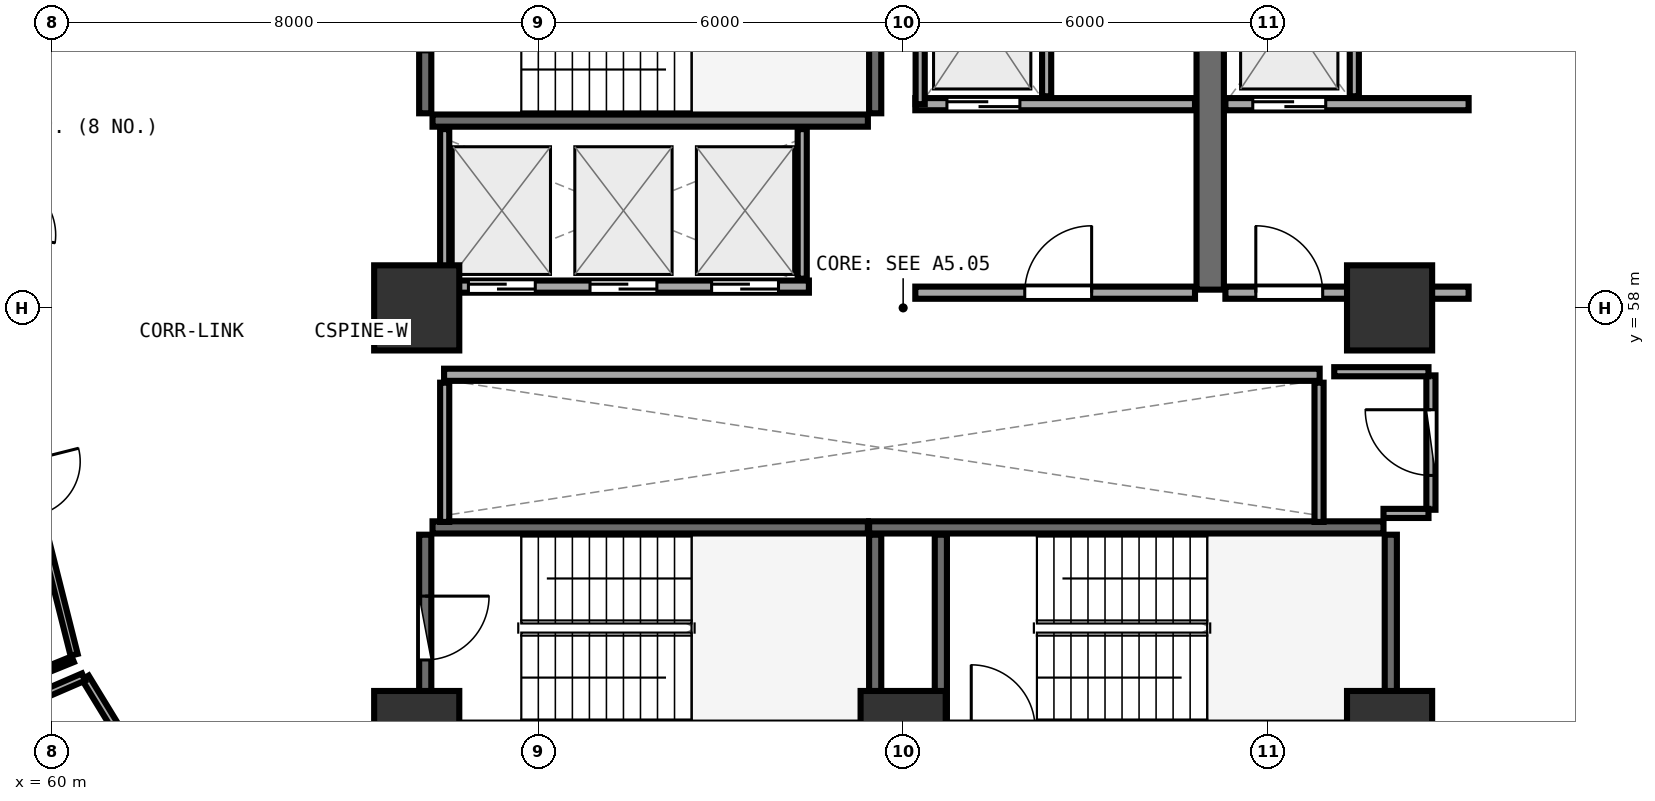
"""IFC4 building model, lengths in metres.
Left out: names, types, materials, properties, quantities, classifications, styles, units other than length and angle.
Written with IfcOpenShell. Run it as: python <this file> out.ifc"""

import sys

from ifc_helpers import new_model, si_unit, direction, frame, frame_2d, origin, origin_2d, place, context, subcontext, project, spatial, rectangle, extrude, element, fill, save


model = new_model("IFC4")
c1 = context("Model", 3, precision=1e-05, world=origin(), true_north=direction((0.0, 1.0)))
c2 = subcontext(c1, "Body", "Model", "MODEL_VIEW")
j1 = project(units=[si_unit("LENGTHUNIT", "METRE"), si_unit("PLANEANGLEUNIT", "RADIAN")], contexts=[c1])
p1 = place(None, origin())
s1 = spatial("IfcSite", under=j1, at=p1, CompositionType="ELEMENT")
p2 = place(p1, origin())
s2 = spatial("IfcBuilding", under=s1, at=p2, CompositionType="ELEMENT")
p3 = place(p2, frame((0.0, 0.0, 26.25)))
s3 = spatial("IfcBuildingStorey", under=s2, at=p3, CompositionType="ELEMENT", Elevation=26.25)
for number, where, z_axis, x_axis in (
    (1, (66.0, 51.0, 0.0), (0.0, 0.0, 1.0), (1.0, 0.0, 0.0)),
    (2, (74.0, 51.0, 0.0), (0.0, 0.0, 1.0), (1.0, 0.0, 0.0)),
    (3, (82.0, 51.0, 0.0), (0.0, 0.0, 1.0), (1.0, 0.0, 0.0)),
    (4, (82.0, 58.0, 0.0), (0.0, 0.0, 1.0), (1.0, 0.0, 0.0)),
    (5, (66.0, 58.0, 0.0), (0.0, 0.0, 1.0), (1.0, 0.0, 0.0)),
):
    element("IfcColumn", number, at=place(p3, frame(where, z_axis=z_axis, x_axis=x_axis)), inside=s3, PredefinedType="PILASTER", context=c2, shape_type="SweptSolid", body=[
        extrude(rectangle(XDim=1.4, YDim=1.4, at=origin_2d()), origin(), (0.0, 0.0, 1.0), 3.75),
    ])
p4 = place(p3, frame((66.26, 61.08, 0.0), z_axis=(0.0, 0.0, 1.0), x_axis=(1.0, 0.0, 0.0)))
e6 = element("IfcWall", 6, at=p4, inside=s3, PredefinedType="SHEAR", context=c2, shape_type="SweptSolid", body=[
    extrude(rectangle(XDim=7.16, YDim=0.2, at=frame_2d((3.58, 0.0))), origin(), (0.0, 0.0, 1.0), 3.49),
])
p5 = place(p3, frame((73.54, 61.2, 0.0), z_axis=(0.0, 0.0, 1.0), x_axis=(0.0, 1.0, 0.0)))
e7 = element("IfcWall", 7, at=p5, inside=s3, PredefinedType="SHEAR", context=c2, shape_type="SweptSolid", body=[
    extrude(rectangle(XDim=3.07, YDim=0.2, at=frame_2d((1.535, 0.0))), origin(), (0.0, 0.0, 1.0), 3.49),
])
p6 = place(p3, frame((66.14, 64.27, 0.0), z_axis=(0.0, 0.0, 1.0), x_axis=(0.0, -1.0, 0.0)))
e8 = element("IfcWall", 8, at=p6, inside=s3, PredefinedType="SHEAR", context=c2, shape_type="SweptSolid", body=[
    extrude(rectangle(XDim=3.07, YDim=0.2, at=frame_2d((1.535, 0.0))), origin(), (0.0, 0.0, 1.0), 3.49),
])
p7 = place(p6, frame((1.01, 0.0, 0.0)))
e9 = element("IfcOpeningElement", 9, at=p7, cuts=e8, PredefinedType="OPENING", context=c2, shape_type="SweptSolid", body=[
    extrude(rectangle(XDim=1.05, YDim=2.1, at=frame_2d((0.525, 1.05))), frame((0.0, 0.11, 0.0), z_axis=(0.0, -1.0, 0.0), x_axis=(1.0, 0.0, 0.0)), (0.0, 0.0, 1.0), 0.22),
])
p8 = place(p3, frame((82.02, 51.2, 0.0), z_axis=(0.0, 0.0, 1.0), x_axis=(0.0, 1.0, 0.0)))
e10 = element("IfcWall", 10, at=p8, inside=s3, PredefinedType="SHEAR", context=c2, shape_type="SweptSolid", body=[
    extrude(rectangle(XDim=3.07, YDim=0.2, at=frame_2d((1.535, 0.0))), origin(), (0.0, 0.0, 1.0), 3.49),
])
p9 = place(p3, frame((81.9, 54.39, 0.0), z_axis=(0.0, 0.0, 1.0), x_axis=(-1.0, 0.0, 0.0)))
e11 = element("IfcWall", 11, at=p9, inside=s3, PredefinedType="SHEAR", context=c2, shape_type="SweptSolid", body=[
    extrude(rectangle(XDim=8.46, YDim=0.2, at=frame_2d((4.23, 0.0))), origin(), (0.0, 0.0, 1.0), 3.49),
])
for number, where, z_axis, x_axis in (
    (12, (74.62, 54.27, 0.0), (0.0, 0.0, 1.0), (0.0, -1.0, 0.0)),
    (13, (73.54, 51.2, 0.0), (0.0, 0.0, 1.0), (0.0, 1.0, 0.0)),
):
    element("IfcWall", number, at=place(p3, frame(where, z_axis=z_axis, x_axis=x_axis)), inside=s3, PredefinedType="SHEAR", context=c2, shape_type="SweptSolid", body=[
        extrude(rectangle(XDim=3.07, YDim=0.2, at=frame_2d((1.535, 0.0))), origin(), (0.0, 0.0, 1.0), 3.49),
    ])
p10 = place(p3, frame((73.42, 54.39, 0.0), z_axis=(0.0, 0.0, 1.0), x_axis=(-1.0, 0.0, 0.0)))
e14 = element("IfcWall", 14, at=p10, inside=s3, PredefinedType="SHEAR", context=c2, shape_type="SweptSolid", body=[
    extrude(rectangle(XDim=7.16, YDim=0.2, at=frame_2d((3.58, 0.0))), origin(), (0.0, 0.0, 1.0), 3.49),
])
p11 = place(p3, frame((66.14, 54.27, 0.0), z_axis=(0.0, 0.0, 1.0), x_axis=(0.0, -1.0, 0.0)))
e15 = element("IfcWall", 15, at=p11, inside=s3, PredefinedType="SHEAR", context=c2, shape_type="SweptSolid", body=[
    extrude(rectangle(XDim=3.07, YDim=0.2, at=frame_2d((1.535, 0.0))), origin(), (0.0, 0.0, 1.0), 3.49),
])
p12 = place(p11, frame((1.01, 0.0, 0.0)))
e16 = element("IfcOpeningElement", 16, at=p12, cuts=e15, PredefinedType="OPENING", context=c2, shape_type="SweptSolid", body=[
    extrude(rectangle(XDim=1.05, YDim=2.1, at=frame_2d((0.525, 1.05))), frame((0.0, 0.11, 0.0), z_axis=(0.0, -1.0, 0.0), x_axis=(1.0, 0.0, 0.0)), (0.0, 0.0, 1.0), 0.22),
])
p13 = place(p3, frame((79.05, 58.3, 0.0), z_axis=(0.0, 0.0, 1.0), x_axis=(0.0, 1.0, 0.0)))
e17 = element("IfcWall", 17, at=p13, inside=s3, PredefinedType="SHEAR", context=c2, shape_type="SweptSolid", body=[
    extrude(rectangle(XDim=6.3, YDim=0.45, at=frame_2d((3.15, 0.0))), origin(), (0.0, 0.0, 1.0), 3.49),
])
p14 = place(p3, frame((74.2, 61.35, 0.0), z_axis=(0.0, 0.0, 1.0), x_axis=(1.0, 0.0, 0.0)))
e18 = element("IfcWall", 18, at=p14, inside=s3, PredefinedType="SOLIDWALL", context=c2, shape_type="SweptSolid", body=[
    extrude(rectangle(XDim=4.6, YDim=0.2, at=frame_2d((2.3, 0.0))), origin(), (0.0, 0.0, 1.0), 3.48),
])
p15 = place(p14, frame((0.52, 0.0, 0.0)))
e19 = element("IfcOpeningElement", 19, at=p15, cuts=e18, PredefinedType="OPENING", context=c2, shape_type="SweptSolid", body=[
    extrude(rectangle(XDim=1.2, YDim=2.15, at=frame_2d((0.6, 1.075))), frame((0.0, 0.11, 0.0), z_axis=(0.0, -1.0, 0.0), x_axis=(1.0, 0.0, 0.0)), (0.0, 0.0, 1.0), 0.22),
])
p16 = place(p3, frame((74.28, 61.35, 0.0), z_axis=(0.0, 0.0, 1.0), x_axis=(0.0, 1.0, 0.0)))
e20 = element("IfcWall", 20, at=p16, inside=s3, PredefinedType="PARTITIONING", context=c2, shape_type="SweptSolid", body=[
    extrude(rectangle(XDim=2.97, YDim=0.15, at=frame_2d((1.485, 0.0))), origin(), (0.0, 0.0, 1.0), 3.48),
])
p17 = place(p3, frame((76.36, 61.48, 0.0), z_axis=(0.0, 0.0, 1.0), x_axis=(0.0, 1.0, 0.0)))
e21 = element("IfcWall", 21, at=p17, inside=s3, PredefinedType="PARTITIONING", context=c2, shape_type="SweptSolid", body=[
    extrude(rectangle(XDim=2.84, YDim=0.15, at=frame_2d((1.42, 0.0))), origin(), (0.0, 0.0, 1.0), 3.48),
])
p18 = place(p3, frame((79.3, 61.35, 0.0), z_axis=(0.0, 0.0, 1.0), x_axis=(1.0, 0.0, 0.0)))
e22 = element("IfcWall", 22, at=p18, inside=s3, PredefinedType="SOLIDWALL", context=c2, shape_type="SweptSolid", body=[
    extrude(rectangle(XDim=4.0, YDim=0.2, at=frame_2d((2.0, 0.0))), origin(), (0.0, 0.0, 1.0), 2.775),
])
p19 = place(p18, frame((0.45, 0.0, 0.0)))
e23 = element("IfcOpeningElement", 23, at=p19, cuts=e22, PredefinedType="OPENING", context=c2, shape_type="SweptSolid", body=[
    extrude(rectangle(XDim=1.2, YDim=2.15, at=frame_2d((0.6, 1.075))), frame((0.0, 0.11, 0.0), z_axis=(0.0, -1.0, 0.0), x_axis=(1.0, 0.0, 0.0)), (0.0, 0.0, 1.0), 0.22),
])
p20 = place(p3, frame((81.42, 61.48, 0.0), z_axis=(0.0, 0.0, 1.0), x_axis=(0.0, 1.0, 0.0)))
e24 = element("IfcWall", 24, at=p20, inside=s3, PredefinedType="PARTITIONING", context=c2, shape_type="SweptSolid", body=[
    extrude(rectangle(XDim=2.84, YDim=0.15, at=frame_2d((1.42, 0.0))), origin(), (0.0, 0.0, 1.0), 3.48),
])
p21 = place(p3, frame((74.2, 58.25, 0.0), z_axis=(0.0, 0.0, 1.0), x_axis=(1.0, 0.0, 0.0)))
e25 = element("IfcWall", 25, at=p21, inside=s3, PredefinedType="SOLIDWALL", context=c2, shape_type="SweptSolid", body=[
    extrude(rectangle(XDim=4.6, YDim=0.2, at=frame_2d((2.3, 0.0))), origin(), (0.0, 0.0, 1.0), 3.48),
])
p22 = place(p21, frame((1.8, 0.0, 0.0)))
e26 = element("IfcOpeningElement", 26, at=p22, cuts=e25, PredefinedType="OPENING", context=c2, shape_type="SweptSolid", body=[
    extrude(rectangle(XDim=1.1, YDim=2.1, at=frame_2d((0.55, 1.05))), frame((0.0, 0.11, 0.0), z_axis=(0.0, -1.0, 0.0), x_axis=(1.0, 0.0, 0.0)), (0.0, 0.0, 1.0), 0.22),
])
p23 = place(p3, frame((79.3, 58.25, 0.0), z_axis=(0.0, 0.0, 1.0), x_axis=(1.0, 0.0, 0.0)))
e27 = element("IfcWall", 27, at=p23, inside=s3, PredefinedType="SOLIDWALL", context=c2, shape_type="SweptSolid", body=[
    extrude(rectangle(XDim=4.0, YDim=0.2, at=frame_2d((2.0, 0.0))), origin(), (0.0, 0.0, 1.0), 2.775),
])
p24 = place(p23, frame((0.5, 0.0, 0.0)))
e28 = element("IfcOpeningElement", 28, at=p24, cuts=e27, PredefinedType="OPENING", context=c2, shape_type="SweptSolid", body=[
    extrude(rectangle(XDim=1.1, YDim=2.1, at=frame_2d((0.55, 1.05))), frame((0.0, 0.11, 0.0), z_axis=(0.0, -1.0, 0.0), x_axis=(1.0, 0.0, 0.0)), (0.0, 0.0, 1.0), 0.22),
])
p25 = place(p3, frame((66.45, 58.35, 0.0), z_axis=(0.0, 0.0, 1.0), x_axis=(1.0, 0.0, 0.0)))
e29 = element("IfcWall", 29, at=p25, inside=s3, PredefinedType="SOLIDWALL", context=c2, shape_type="SweptSolid", body=[
    extrude(rectangle(XDim=6.0, YDim=0.2, at=frame_2d((3.0, 0.0))), origin(), (0.0, 0.0, 1.0), 3.48),
])
p26 = place(p25, frame((0.4, 0.0, 0.0)))
e30 = element("IfcOpeningElement", 30, at=p26, cuts=e29, PredefinedType="OPENING", context=c2, shape_type="SweptSolid", body=[
    extrude(rectangle(XDim=1.1, YDim=2.1, at=frame_2d((0.55, 1.05))), frame((0.0, 0.11, 0.0), z_axis=(0.0, -1.0, 0.0), x_axis=(1.0, 0.0, 0.0)), (0.0, 0.0, 1.0), 0.22),
])
p27 = place(p25, frame((2.4, 0.0, 0.0)))
e31 = element("IfcOpeningElement", 31, at=p27, cuts=e29, PredefinedType="OPENING", context=c2, shape_type="SweptSolid", body=[
    extrude(rectangle(XDim=1.1, YDim=2.1, at=frame_2d((0.55, 1.05))), frame((0.0, 0.11, 0.0), z_axis=(0.0, -1.0, 0.0), x_axis=(1.0, 0.0, 0.0)), (0.0, 0.0, 1.0), 0.22),
])
p28 = place(p25, frame((4.4, 0.0, 0.0)))
e32 = element("IfcOpeningElement", 32, at=p28, cuts=e29, PredefinedType="OPENING", context=c2, shape_type="SweptSolid", body=[
    extrude(rectangle(XDim=1.1, YDim=2.1, at=frame_2d((0.55, 1.05))), frame((0.0, 0.11, 0.0), z_axis=(0.0, -1.0, 0.0), x_axis=(1.0, 0.0, 0.0)), (0.0, 0.0, 1.0), 0.22),
])
for number, where, z_axis, x_axis in (
    (33, (66.46, 58.48, 0.0), (0.0, 0.0, 1.0), (0.0, 1.0, 0.0)),
    (34, (72.34, 58.48, 0.0), (0.0, 0.0, 1.0), (0.0, 1.0, 0.0)),
):
    element("IfcWall", number, at=place(p3, frame(where, z_axis=z_axis, x_axis=x_axis)), inside=s3, PredefinedType="PARTITIONING", context=c2, shape_type="SweptSolid", body=[
        extrude(rectangle(XDim=2.46, YDim=0.15, at=frame_2d((1.23, 0.0))), origin(), (0.0, 0.0, 1.0), 3.48),
    ])
p29 = place(p3, frame((66.45, 56.9, 0.0), z_axis=(0.0, 0.0, 1.0), x_axis=(1.0, 0.0, 0.0)))
e35 = element("IfcWall", 35, at=p29, inside=s3, PredefinedType="SOLIDWALL", context=c2, shape_type="SweptSolid", body=[
    extrude(rectangle(XDim=14.4, YDim=0.2, at=frame_2d((7.2, 0.0))), origin(), (0.0, 0.0, 1.0), 3.48),
])
for number, where, z_axis, x_axis in (
    (36, (66.46, 54.48, 0.0), (0.0, 0.0, 1.0), (0.0, 1.0, 0.0)),
    (37, (80.84, 54.48, 0.0), (0.0, 0.0, 1.0), (0.0, 1.0, 0.0)),
):
    element("IfcWall", number, at=place(p3, frame(where, z_axis=z_axis, x_axis=x_axis)), inside=s3, PredefinedType="PARTITIONING", context=c2, shape_type="SweptSolid", body=[
        extrude(rectangle(XDim=2.29, YDim=0.15, at=frame_2d((1.145, 0.0))), origin(), (0.0, 0.0, 1.0), 3.48),
    ])
p30 = place(p3, frame((82.68, 54.68, 0.0), z_axis=(0.0, 0.0, 1.0), x_axis=(0.0, 1.0, 0.0)))
e38 = element("IfcWall", 38, at=p30, inside=s3, PredefinedType="PARTITIONING", context=c2, shape_type="SweptSolid", body=[
    extrude(rectangle(XDim=2.21, YDim=0.15, at=frame_2d((1.105, 0.0))), origin(), (0.0, 0.0, 1.0), 3.48),
])
p31 = place(p30, frame((0.565, 0.0, 0.0)))
e39 = element("IfcOpeningElement", 39, at=p31, cuts=e38, PredefinedType="OPENING", context=c2, shape_type="SweptSolid", body=[
    extrude(rectangle(XDim=1.08, YDim=2.1, at=frame_2d((0.54, 1.05))), frame((0.0, 0.085, 0.0), z_axis=(0.0, -1.0, 0.0), x_axis=(1.0, 0.0, 0.0)), (0.0, 0.0, 1.0), 0.17),
])
p32 = place(p3, frame((58.986, 57.775, 0.0), z_axis=(0.0, 0.0, 1.0), x_axis=(0.244192294026, -0.969726829338, 0.0)))
e40 = element("IfcWall", 40, at=p32, inside=s3, PredefinedType="PARTITIONING", context=c2, shape_type="SweptSolid", body=[
    extrude(rectangle(XDim=5.651, YDim=0.12, at=frame_2d((2.825, 0.0))), origin(), (0.0, 0.0, 1.0), 3.48),
])
p33 = place(p32, frame((2.375, 0.0, 0.0)))
e41 = element("IfcOpeningElement", 41, at=p33, cuts=e40, PredefinedType="OPENING", context=c2, shape_type="SweptSolid", body=[
    extrude(rectangle(XDim=0.9, YDim=2.08, at=frame_2d((0.45, 1.04))), frame((0.0, 0.07, 0.0), z_axis=(0.0, -1.0, 0.0), x_axis=(1.0, 0.0, 0.0)), (0.0, 0.0, 1.0), 0.14),
])
p34 = place(p3, frame((81.9, 54.62, 0.0), z_axis=(0.0, 0.0, 1.0), x_axis=(1.0, 0.0, 0.0)))
e42 = element("IfcWall", 42, at=p34, inside=s3, PredefinedType="PARTITIONING", context=c2, shape_type="SweptSolid", body=[
    extrude(rectangle(XDim=0.74, YDim=0.15, at=frame_2d((0.37, 0.0))), origin(), (0.0, 0.0, 1.0), 2.775),
])
p35 = place(p3, frame((82.64, 56.95, 0.0), z_axis=(0.0, 0.0, 1.0), x_axis=(-1.0, 0.0, 0.0)))
e43 = element("IfcWall", 43, at=p35, inside=s3, PredefinedType="PARTITIONING", context=c2, shape_type="SweptSolid", body=[
    extrude(rectangle(XDim=1.55, YDim=0.15, at=frame_2d((0.775, 0.0))), origin(), (0.0, 0.0, 1.0), 2.775),
])
p36 = place(p3, frame((60.343, 52.222, 0.0), z_axis=(0.0, 0.0, 1.0), x_axis=(-0.926333713065, -0.376703931542, 0.0)))
e44 = element("IfcWall", 44, at=p36, inside=s3, PredefinedType="PARTITIONING", context=c2, shape_type="SweptSolid", body=[
    extrude(rectangle(XDim=12.099, YDim=0.1, at=frame_2d((6.05, 0.0))), origin(), (0.0, 0.0, 1.0), 2.875),
])
p37 = place(p3, frame((60.549, 51.92, 0.0), z_axis=(0.0, 0.0, 1.0), x_axis=(0.52146609248, -0.853272004928, 0.0)))
e45 = element("IfcWall", 45, at=p37, inside=s3, PredefinedType="PLUMBINGWALL", context=c2, shape_type="SweptSolid", body=[
    extrude(rectangle(XDim=1.228, YDim=0.13, at=frame_2d((0.614, 0.0))), origin(), (0.0, 0.0, 1.0), 3.48),
])
p38 = place(p3, frame((55.91, 49.935, 0.0), z_axis=(0.0, 0.0, 1.0), x_axis=(0.917797204715, 0.397049481826, 0.0)))
e46 = element("IfcWall", 46, at=p38, inside=s3, PredefinedType="PLUMBINGWALL", context=c2, shape_type="SweptSolid", body=[
    extrude(rectangle(XDim=5.023, YDim=0.13, at=frame_2d((2.511, 0.0))), origin(), (0.0, 0.0, 1.0), 2.875),
])
p39 = place(p12, origin())
e47 = element("IfcDoor", 47, at=p39, inside=s3, OperationType="SINGLE_SWING_LEFT", PredefinedType="DOOR", context=c2, shape_type="SweptSolid", body=[
    extrude(rectangle(XDim=1.05, YDim=2.1, at=frame_2d((0.525, 1.05))), frame((0.0, 0.025, 0.0), z_axis=(0.0, -1.0, 0.0), x_axis=(1.0, 0.0, 0.0)), (0.0, 0.0, 1.0), 0.05),
])
fill(e16, e47)
p40 = place(p15, origin())
e48 = element("IfcDoor", 48, at=p40, inside=s3, OperationType="DOUBLE_DOOR_SLIDING", PredefinedType="DOOR", context=c2, shape_type="SweptSolid", body=[
    extrude(rectangle(XDim=1.2, YDim=2.15, at=frame_2d((0.6, 1.075))), frame((0.0, 0.025, 0.0), z_axis=(0.0, -1.0, 0.0), x_axis=(1.0, 0.0, 0.0)), (0.0, 0.0, 1.0), 0.05),
])
fill(e19, e48)
p41 = place(p19, origin())
e49 = element("IfcDoor", 49, at=p41, inside=s3, OperationType="DOUBLE_DOOR_SLIDING", PredefinedType="DOOR", context=c2, shape_type="SweptSolid", body=[
    extrude(rectangle(XDim=1.2, YDim=2.15, at=frame_2d((0.6, 1.075))), frame((0.0, 0.025, 0.0), z_axis=(0.0, -1.0, 0.0), x_axis=(1.0, 0.0, 0.0)), (0.0, 0.0, 1.0), 0.05),
])
fill(e23, e49)
p42 = place(p22, frame((1.1, 0.0, 0.0), z_axis=(0.0, 0.0, 1.0), x_axis=(-1.0, 0.0, 0.0)))
e50 = element("IfcDoor", 50, at=p42, inside=s3, OperationType="SINGLE_SWING_LEFT", PredefinedType="DOOR", context=c2, shape_type="SweptSolid", body=[
    extrude(rectangle(XDim=1.1, YDim=2.1, at=frame_2d((0.55, 1.05))), frame((0.0, 0.025, 0.0), z_axis=(0.0, -1.0, 0.0), x_axis=(1.0, 0.0, 0.0)), (0.0, 0.0, 1.0), 0.05),
])
fill(e26, e50)
p43 = place(p24, frame((1.1, 0.0, 0.0), z_axis=(0.0, 0.0, 1.0), x_axis=(-1.0, 0.0, 0.0)))
e51 = element("IfcDoor", 51, at=p43, inside=s3, OperationType="SINGLE_SWING_RIGHT", PredefinedType="DOOR", context=c2, shape_type="SweptSolid", body=[
    extrude(rectangle(XDim=1.1, YDim=2.1, at=frame_2d((0.55, 1.05))), frame((0.0, 0.025, 0.0), z_axis=(0.0, -1.0, 0.0), x_axis=(1.0, 0.0, 0.0)), (0.0, 0.0, 1.0), 0.05),
])
fill(e28, e51)
p44 = place(p26, origin())
e52 = element("IfcDoor", 52, at=p44, inside=s3, OperationType="DOUBLE_DOOR_SLIDING", PredefinedType="DOOR", context=c2, shape_type="SweptSolid", body=[
    extrude(rectangle(XDim=1.1, YDim=2.1, at=frame_2d((0.55, 1.05))), frame((0.0, 0.025, 0.0), z_axis=(0.0, -1.0, 0.0), x_axis=(1.0, 0.0, 0.0)), (0.0, 0.0, 1.0), 0.05),
])
fill(e30, e52)
p45 = place(p27, origin())
e53 = element("IfcDoor", 53, at=p45, inside=s3, OperationType="DOUBLE_DOOR_SLIDING", PredefinedType="DOOR", context=c2, shape_type="SweptSolid", body=[
    extrude(rectangle(XDim=1.1, YDim=2.1, at=frame_2d((0.55, 1.05))), frame((0.0, 0.025, 0.0), z_axis=(0.0, -1.0, 0.0), x_axis=(1.0, 0.0, 0.0)), (0.0, 0.0, 1.0), 0.05),
])
fill(e31, e53)
p46 = place(p28, origin())
e54 = element("IfcDoor", 54, at=p46, inside=s3, OperationType="DOUBLE_DOOR_SLIDING", PredefinedType="DOOR", context=c2, shape_type="SweptSolid", body=[
    extrude(rectangle(XDim=1.1, YDim=2.1, at=frame_2d((0.55, 1.05))), frame((0.0, 0.025, 0.0), z_axis=(0.0, -1.0, 0.0), x_axis=(1.0, 0.0, 0.0)), (0.0, 0.0, 1.0), 0.05),
])
fill(e32, e54)
p47 = place(p31, origin())
e55 = element("IfcDoor", 55, at=p47, inside=s3, OperationType="SINGLE_SWING_RIGHT", PredefinedType="DOOR", context=c2, shape_type="SweptSolid", body=[
    extrude(rectangle(XDim=1.08, YDim=2.1, at=frame_2d((0.54, 1.05))), frame((0.0, 0.025, 0.0), z_axis=(0.0, -1.0, 0.0), x_axis=(1.0, 0.0, 0.0)), (0.0, 0.0, 1.0), 0.05),
])
fill(e39, e55)
save(model, sys.argv[1])
